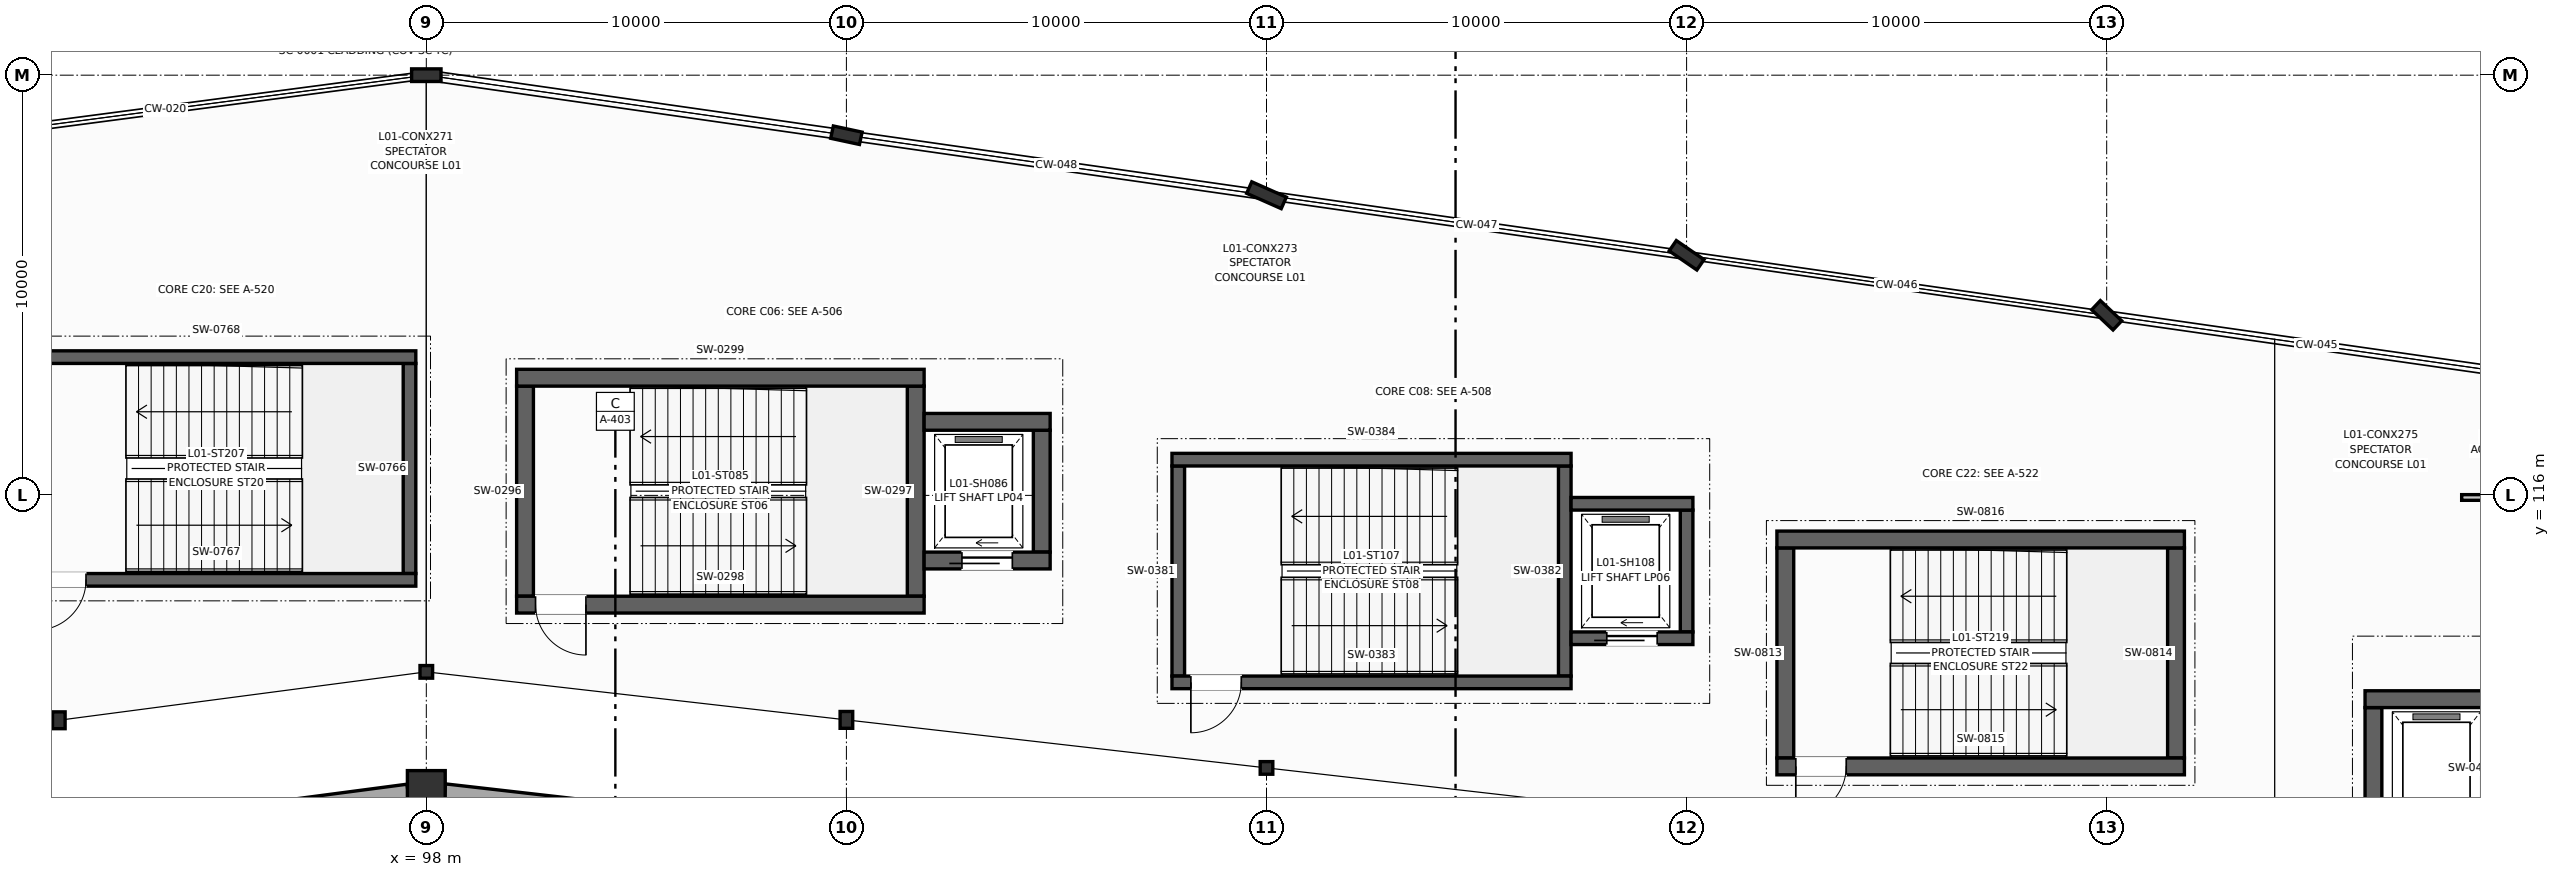
"""IFC4 building model, lengths in metres.
Left out: names, types, materials, properties, quantities, classifications, styles, units other than length and angle.
Written with IfcOpenShell. Run it as: python <this file> out.ifc"""

import sys

from ifc_helpers import new_model, si_unit, direction, frame, frame_2d, origin, origin_2d, place, context, subcontext, project, spatial, rectangle, i_section, extrude, element, fill, save


model = new_model("IFC4")
c1 = context("Model", 3, precision=1e-05, world=origin(), true_north=direction((0.0, 1.0)))
c2 = subcontext(c1, "Body", "Model", "MODEL_VIEW")
j1 = project(units=[si_unit("LENGTHUNIT", "METRE"), si_unit("PLANEANGLEUNIT", "RADIAN")], contexts=[c1])
p1 = place(None, origin())
s1 = spatial("IfcSite", under=j1, at=p1, CompositionType="ELEMENT")
p2 = place(p1, origin())
s2 = spatial("IfcBuilding", under=s1, at=p2, CompositionType="ELEMENT")
p3 = place(p2, frame((0.0, 0.0, 4.5)))
s3 = spatial("IfcBuildingStorey", under=s2, at=p3, CompositionType="ELEMENT", Elevation=4.5)
p4 = place(p3, frame((98.0, 109.0, 0.0), z_axis=(0.0, 0.0, 1.0), x_axis=(0.0, 1.0, 0.0)))
e1 = element("IfcColumn", 1, at=p4, inside=s3, PredefinedType="COLUMN", context=c2, shape_type="SweptSolid", body=[
    extrude(rectangle(XDim=0.9, YDim=0.9, at=origin_2d()), origin(), (0.0, 0.0, 1.0), 4.5),
])
p5 = place(p3, frame((98.0, 111.8, 0.0), z_axis=(0.0, 0.0, 1.0), x_axis=(1.0, 0.0, 0.0)))
e2 = element("IfcColumn", 2, at=p5, inside=s3, PredefinedType="COLUMN", context=c2, shape_type="SweptSolid", body=[
    extrude(i_section(OverallWidth=0.3, OverallDepth=0.3, WebThickness=0.011, FlangeThickness=0.019, at=origin_2d()), origin(), (0.0, 0.0, 1.0), 4.5),
])
p6 = place(p3, frame((89.252, 110.648, 0.0), z_axis=(0.0, 0.0, 1.0), x_axis=(1.0, 0.0, 0.0)))
e3 = element("IfcColumn", 3, at=p6, inside=s3, PredefinedType="COLUMN", context=c2, shape_type="SweptSolid", body=[
    extrude(i_section(OverallWidth=0.3, OverallDepth=0.4, WebThickness=0.013, FlangeThickness=0.024, at=origin_2d()), origin(), (0.0, 0.0, 1.0), 4.5),
])
p7 = place(p3, frame((118.0, 109.514, 0.0), z_axis=(0.0, 0.0, 1.0), x_axis=(1.0, 0.0, 0.0)))
e4 = element("IfcColumn", 4, at=p7, inside=s3, PredefinedType="COLUMN", context=c2, shape_type="SweptSolid", body=[
    extrude(i_section(OverallWidth=0.3, OverallDepth=0.3, WebThickness=0.011, FlangeThickness=0.019, at=origin_2d()), origin(), (0.0, 0.0, 1.0), 4.5),
])
p8 = place(p3, frame((108.0, 110.657, 0.0), z_axis=(0.0, 0.0, 1.0), x_axis=(1.0, 0.0, 0.0)))
e5 = element("IfcColumn", 5, at=p8, inside=s3, PredefinedType="COLUMN", context=c2, shape_type="SweptSolid", body=[
    extrude(i_section(OverallWidth=0.3, OverallDepth=0.4, WebThickness=0.013, FlangeThickness=0.024, at=origin_2d()), origin(), (0.0, 0.0, 1.0), 4.5),
])
for number, where, z_axis, x_axis in (
    (6, (98.0, 126.0, 0.0), (0.0, 0.0, 1.0), (0.0, 1.0, 0.0)),
    (7, (138.0, 120.286, 0.0), (0.0, 0.0, 1.0), (0.687, 0.727, 0.0)),
):
    element("IfcColumn", number, at=place(p3, frame(where, z_axis=z_axis, x_axis=x_axis)), inside=s3, PredefinedType="COLUMN", context=c2, shape_type="SweptSolid", body=[
        extrude(i_section(OverallWidth=0.3, OverallDepth=0.7, WebThickness=0.017, FlangeThickness=0.032, at=origin_2d()), origin(), (0.0, 0.0, 1.0), 4.5),
    ])
p9 = place(p3, frame((128.0, 121.714, 0.0), z_axis=(0.0, 0.0, 1.0), x_axis=(0.566406236925, 0.824126188622, 0.0)))
e8 = element("IfcColumn", 8, at=p9, inside=s3, PredefinedType="COLUMN", context=c2, shape_type="SweptSolid", body=[
    extrude(i_section(OverallWidth=0.3, OverallDepth=0.8, WebThickness=0.018, FlangeThickness=0.033, at=origin_2d()), origin(), (0.0, 0.0, 1.0), 4.5),
])
p10 = place(p3, frame((118.0, 123.143, 0.0), z_axis=(0.0, 0.0, 1.0), x_axis=(0.40514158678, 0.914253955234, 0.0)))
e9 = element("IfcColumn", 9, at=p10, inside=s3, PredefinedType="COLUMN", context=c2, shape_type="SweptSolid", body=[
    extrude(i_section(OverallWidth=0.3, OverallDepth=0.9, WebThickness=0.019, FlangeThickness=0.035, at=origin_2d()), origin(), (0.0, 0.0, 1.0), 4.5),
])
p11 = place(p3, frame((108.0, 124.571, 0.0), z_axis=(0.0, 0.0, 1.0), x_axis=(0.209618562904, 0.977783236759, 0.0)))
e10 = element("IfcColumn", 10, at=p11, inside=s3, PredefinedType="COLUMN", context=c2, shape_type="SweptSolid", body=[
    extrude(i_section(OverallWidth=0.3, OverallDepth=0.7, WebThickness=0.017, FlangeThickness=0.032, at=origin_2d()), origin(), (0.0, 0.0, 1.0), 4.5),
])
p12 = place(p3, frame((97.564, 108.943, 0.0), z_axis=(0.0, 0.0, 1.0), x_axis=(-0.991432160885, -0.130622625772, 0.0)))
e11 = element("IfcWall", 11, at=p12, inside=s3, PredefinedType="SOLIDWALL", context=c2, shape_type="SweptSolid", body=[
    extrude(rectangle(XDim=7.213, YDim=0.37, at=frame_2d((3.606, 0.0))), origin(), (0.0, 0.0, 1.0), 3.3),
])
p13 = place(p3, frame((107.563, 107.907, 0.0), z_axis=(0.0, 0.0, 1.0), x_axis=(-0.993532672656, 0.113546591161, 0.0)))
e12 = element("IfcWall", 12, at=p13, inside=s3, PredefinedType="SOLIDWALL", context=c2, shape_type="SweptSolid", body=[
    extrude(rectangle(XDim=9.185, YDim=0.37, at=frame_2d((4.593, 0.0))), origin(), (0.0, 0.0, 1.0), 3.3),
])
for number, where, z_axis, x_axis in (
    (13, (100.35, 113.6, 0.0), (0.0, 0.0, 1.0), (0.0, 1.0, 0.0)),
    (14, (109.65, 113.6, 0.0), (0.0, 0.0, 1.0), (0.0, 1.0, 0.0)),
):
    element("IfcWall", number, at=place(p3, frame(where, z_axis=z_axis, x_axis=x_axis)), inside=s3, PredefinedType="SHEAR", context=c2, shape_type="SweptSolid", body=[
        extrude(rectangle(XDim=5.0, YDim=0.4, at=frame_2d((2.5, 0.0))), origin(), (0.0, 0.0, 1.0), 4.25),
    ])
p14 = place(p3, frame((100.15, 113.4, 0.0), z_axis=(0.0, 0.0, 1.0), x_axis=(1.0, 0.0, 0.0)))
e15 = element("IfcWall", 15, at=p14, inside=s3, PredefinedType="SHEAR", context=c2, shape_type="SweptSolid", body=[
    extrude(rectangle(XDim=9.7, YDim=0.4, at=frame_2d((4.85, 0.0))), origin(), (0.0, 0.0, 1.0), 4.25),
])
p15 = place(p14, frame((0.45, 0.0, 0.0)))
e16 = element("IfcOpeningElement", 16, at=p15, cuts=e15, PredefinedType="OPENING", context=c2, shape_type="SweptSolid", body=[
    extrude(rectangle(XDim=1.2, YDim=2.2, at=frame_2d((0.6, 1.1))), frame((0.0, 0.21, 0.0), z_axis=(0.0, -1.0, 0.0), x_axis=(1.0, 0.0, 0.0)), (0.0, 0.0, 1.0), 0.42),
])
p16 = place(p3, frame((100.15, 118.8, 0.0), z_axis=(0.0, 0.0, 1.0), x_axis=(1.0, 0.0, 0.0)))
e17 = element("IfcWall", 17, at=p16, inside=s3, PredefinedType="SHEAR", context=c2, shape_type="SweptSolid", body=[
    extrude(rectangle(XDim=9.7, YDim=0.4, at=frame_2d((4.85, 0.0))), origin(), (0.0, 0.0, 1.0), 4.25),
])
p17 = place(p3, frame((112.65, 114.65, 0.0), z_axis=(0.0, 0.0, 1.0), x_axis=(0.0, 1.0, 0.0)))
e18 = element("IfcWall", 18, at=p17, inside=s3, PredefinedType="SHEAR", context=c2, shape_type="SweptSolid", body=[
    extrude(rectangle(XDim=2.9, YDim=0.4, at=frame_2d((1.45, 0.0))), origin(), (0.0, 0.0, 1.0), 4.25),
])
p18 = place(p3, frame((109.85, 114.45, 0.0), z_axis=(0.0, 0.0, 1.0), x_axis=(1.0, 0.0, 0.0)))
e19 = element("IfcWall", 19, at=p18, inside=s3, PredefinedType="SHEAR", context=c2, shape_type="SweptSolid", body=[
    extrude(rectangle(XDim=3.0, YDim=0.4, at=frame_2d((1.5, 0.0))), origin(), (0.0, 0.0, 1.0), 4.25),
])
p19 = place(p18, frame((0.9, 0.0, 0.0)))
e20 = element("IfcOpeningElement", 20, at=p19, cuts=e19, PredefinedType="OPENING", context=c2, shape_type="SweptSolid", body=[
    extrude(rectangle(XDim=1.2, YDim=2.2, at=frame_2d((0.6, 1.1))), frame((0.0, 0.21, 0.0), z_axis=(0.0, -1.0, 0.0), x_axis=(1.0, 0.0, 0.0)), (0.0, 0.0, 1.0), 0.42),
])
p20 = place(p3, frame((109.85, 117.75, 0.0), z_axis=(0.0, 0.0, 1.0), x_axis=(1.0, 0.0, 0.0)))
e21 = element("IfcWall", 21, at=p20, inside=s3, PredefinedType="SHEAR", context=c2, shape_type="SweptSolid", body=[
    extrude(rectangle(XDim=3.0, YDim=0.4, at=frame_2d((1.5, 0.0))), origin(), (0.0, 0.0, 1.0), 4.25),
])
for number, where, z_axis, x_axis in (
    (22, (115.9, 111.7, 0.0), (0.0, 0.0, 1.0), (0.0, 1.0, 0.0)),
    (23, (125.1, 111.7, 0.0), (0.0, 0.0, 1.0), (0.0, 1.0, 0.0)),
):
    element("IfcWall", number, at=place(p3, frame(where, z_axis=z_axis, x_axis=x_axis)), inside=s3, PredefinedType="SHEAR", context=c2, shape_type="SweptSolid", body=[
        extrude(rectangle(XDim=5.0, YDim=0.3, at=frame_2d((2.5, 0.0))), origin(), (0.0, 0.0, 1.0), 4.25),
    ])
p21 = place(p3, frame((115.75, 111.55, 0.0), z_axis=(0.0, 0.0, 1.0), x_axis=(1.0, 0.0, 0.0)))
e24 = element("IfcWall", 24, at=p21, inside=s3, PredefinedType="SHEAR", context=c2, shape_type="SweptSolid", body=[
    extrude(rectangle(XDim=9.5, YDim=0.3, at=frame_2d((4.75, 0.0))), origin(), (0.0, 0.0, 1.0), 4.25),
])
p22 = place(p21, frame((0.45, 0.0, 0.0)))
e25 = element("IfcOpeningElement", 25, at=p22, cuts=e24, PredefinedType="OPENING", context=c2, shape_type="SweptSolid", body=[
    extrude(rectangle(XDim=1.2, YDim=2.2, at=frame_2d((0.6, 1.1))), frame((0.0, 0.16, 0.0), z_axis=(0.0, -1.0, 0.0), x_axis=(1.0, 0.0, 0.0)), (0.0, 0.0, 1.0), 0.32),
])
p23 = place(p3, frame((115.75, 116.85, 0.0), z_axis=(0.0, 0.0, 1.0), x_axis=(1.0, 0.0, 0.0)))
e26 = element("IfcWall", 26, at=p23, inside=s3, PredefinedType="SHEAR", context=c2, shape_type="SweptSolid", body=[
    extrude(rectangle(XDim=9.5, YDim=0.3, at=frame_2d((4.75, 0.0))), origin(), (0.0, 0.0, 1.0), 4.25),
])
p24 = place(p3, frame((128.0, 112.75, 0.0), z_axis=(0.0, 0.0, 1.0), x_axis=(0.0, 1.0, 0.0)))
e27 = element("IfcWall", 27, at=p24, inside=s3, PredefinedType="SHEAR", context=c2, shape_type="SweptSolid", body=[
    extrude(rectangle(XDim=2.9, YDim=0.3, at=frame_2d((1.45, 0.0))), origin(), (0.0, 0.0, 1.0), 4.25),
])
p25 = place(p3, frame((125.25, 112.6, 0.0), z_axis=(0.0, 0.0, 1.0), x_axis=(1.0, 0.0, 0.0)))
e28 = element("IfcWall", 28, at=p25, inside=s3, PredefinedType="SHEAR", context=c2, shape_type="SweptSolid", body=[
    extrude(rectangle(XDim=2.9, YDim=0.3, at=frame_2d((1.45, 0.0))), origin(), (0.0, 0.0, 1.0), 4.25),
])
p26 = place(p25, frame((0.85, 0.0, 0.0)))
e29 = element("IfcOpeningElement", 29, at=p26, cuts=e28, PredefinedType="OPENING", context=c2, shape_type="SweptSolid", body=[
    extrude(rectangle(XDim=1.2, YDim=2.2, at=frame_2d((0.6, 1.1))), frame((0.0, 0.16, 0.0), z_axis=(0.0, -1.0, 0.0), x_axis=(1.0, 0.0, 0.0)), (0.0, 0.0, 1.0), 0.32),
])
p27 = place(p3, frame((125.25, 115.8, 0.0), z_axis=(0.0, 0.0, 1.0), x_axis=(1.0, 0.0, 0.0)))
e30 = element("IfcWall", 30, at=p27, inside=s3, PredefinedType="SHEAR", context=c2, shape_type="SweptSolid", body=[
    extrude(rectangle(XDim=2.9, YDim=0.3, at=frame_2d((1.45, 0.0))), origin(), (0.0, 0.0, 1.0), 4.25),
])
p28 = place(p3, frame((144.35, 108.05, 0.0), z_axis=(0.0, 0.0, 1.0), x_axis=(0.0, 1.0, 0.0)))
e31 = element("IfcWall", 31, at=p28, inside=s3, PredefinedType="SHEAR", context=c2, shape_type="SweptSolid", body=[
    extrude(rectangle(XDim=2.9, YDim=0.4, at=frame_2d((1.45, 0.0))), origin(), (0.0, 0.0, 1.0), 4.25),
])
p29 = place(p3, frame((144.15, 111.15, 0.0), z_axis=(0.0, 0.0, 1.0), x_axis=(1.0, 0.0, 0.0)))
e32 = element("IfcWall", 32, at=p29, inside=s3, PredefinedType="SHEAR", context=c2, shape_type="SweptSolid", body=[
    extrude(rectangle(XDim=3.0, YDim=0.4, at=frame_2d((1.5, 0.0))), origin(), (0.0, 0.0, 1.0), 4.25),
])
p30 = place(p3, frame((97.6, 114.14, 0.0), z_axis=(0.0, 0.0, 1.0), x_axis=(0.0, 1.0, 0.0)))
e33 = element("IfcWall", 33, at=p30, inside=s3, PredefinedType="SHEAR", context=c2, shape_type="SweptSolid", body=[
    extrude(rectangle(XDim=5.0, YDim=0.3, at=frame_2d((2.5, 0.0))), origin(), (0.0, 0.0, 1.0), 4.25),
])
p31 = place(p3, frame((88.25, 113.99, 0.0), z_axis=(0.0, 0.0, 1.0), x_axis=(1.0, 0.0, 0.0)))
e34 = element("IfcWall", 34, at=p31, inside=s3, PredefinedType="SHEAR", context=c2, shape_type="SweptSolid", body=[
    extrude(rectangle(XDim=9.5, YDim=0.3, at=frame_2d((4.75, 0.0))), origin(), (0.0, 0.0, 1.0), 4.25),
])
p32 = place(p31, frame((0.45, 0.0, 0.0)))
e35 = element("IfcOpeningElement", 35, at=p32, cuts=e34, PredefinedType="OPENING", context=c2, shape_type="SweptSolid", body=[
    extrude(rectangle(XDim=1.2, YDim=2.2, at=frame_2d((0.6, 1.1))), frame((0.0, 0.16, 0.0), z_axis=(0.0, -1.0, 0.0), x_axis=(1.0, 0.0, 0.0)), (0.0, 0.0, 1.0), 0.32),
])
p33 = place(p3, frame((88.25, 119.29, 0.0), z_axis=(0.0, 0.0, 1.0), x_axis=(1.0, 0.0, 0.0)))
e36 = element("IfcWall", 36, at=p33, inside=s3, PredefinedType="SHEAR", context=c2, shape_type="SweptSolid", body=[
    extrude(rectangle(XDim=9.5, YDim=0.3, at=frame_2d((4.75, 0.0))), origin(), (0.0, 0.0, 1.0), 4.25),
])
for number, where, z_axis, x_axis in (
    (37, (130.35, 109.75, 0.0), (0.0, 0.0, 1.0), (0.0, 1.0, 0.0)),
    (38, (139.65, 109.75, 0.0), (0.0, 0.0, 1.0), (0.0, 1.0, 0.0)),
):
    element("IfcWall", number, at=place(p3, frame(where, z_axis=z_axis, x_axis=x_axis)), inside=s3, PredefinedType="SHEAR", context=c2, shape_type="SweptSolid", body=[
        extrude(rectangle(XDim=5.0, YDim=0.4, at=frame_2d((2.5, 0.0))), origin(), (0.0, 0.0, 1.0), 4.25),
    ])
p34 = place(p3, frame((130.15, 109.55, 0.0), z_axis=(0.0, 0.0, 1.0), x_axis=(1.0, 0.0, 0.0)))
e39 = element("IfcWall", 39, at=p34, inside=s3, PredefinedType="SHEAR", context=c2, shape_type="SweptSolid", body=[
    extrude(rectangle(XDim=9.7, YDim=0.4, at=frame_2d((4.85, 0.0))), origin(), (0.0, 0.0, 1.0), 4.25),
])
p35 = place(p34, frame((0.45, 0.0, 0.0)))
e40 = element("IfcOpeningElement", 40, at=p35, cuts=e39, PredefinedType="OPENING", context=c2, shape_type="SweptSolid", body=[
    extrude(rectangle(XDim=1.2, YDim=2.2, at=frame_2d((0.6, 1.1))), frame((0.0, 0.21, 0.0), z_axis=(0.0, -1.0, 0.0), x_axis=(1.0, 0.0, 0.0)), (0.0, 0.0, 1.0), 0.42),
])
p36 = place(p3, frame((130.15, 114.95, 0.0), z_axis=(0.0, 0.0, 1.0), x_axis=(1.0, 0.0, 0.0)))
e41 = element("IfcWall", 41, at=p36, inside=s3, PredefinedType="SHEAR", context=c2, shape_type="SweptSolid", body=[
    extrude(rectangle(XDim=9.7, YDim=0.4, at=frame_2d((4.85, 0.0))), origin(), (0.0, 0.0, 1.0), 4.25),
])
p37 = place(p3, frame((146.45, 115.95, 0.0), z_axis=(0.0, 0.0, 1.0), x_axis=(1.0, 0.0, 0.0)))
e42 = element("IfcWall", 42, at=p37, inside=s3, PredefinedType="PARTITIONING", context=c2, shape_type="SweptSolid", body=[
    extrude(rectangle(XDim=13.1, YDim=0.135, at=frame_2d((6.55, 0.0))), origin(), (0.0, 0.0, 1.0), 3.22),
])
p38 = place(p37, frame((5.98, 0.0, 0.0)))
e43 = element("IfcOpeningElement", 43, at=p38, cuts=e42, PredefinedType="OPENING", context=c2, shape_type="SweptSolid", body=[
    extrude(rectangle(XDim=1.14, YDim=2.18, at=frame_2d((0.57, 1.09))), frame((0.0, 0.077, 0.0), z_axis=(0.0, -1.0, 0.0), x_axis=(1.0, 0.0, 0.0)), (0.0, 0.0, 1.0), 0.155),
])
p39 = place(p15, frame((1.2, 0.0, 0.0), z_axis=(0.0, 0.0, 1.0), x_axis=(-1.0, 0.0, 0.0)))
e44 = element("IfcDoor", 44, at=p39, inside=s3, OperationType="SINGLE_SWING_RIGHT", PredefinedType="DOOR", context=c2, shape_type="SweptSolid", body=[
    extrude(rectangle(XDim=1.2, YDim=2.2, at=frame_2d((0.6, 1.1))), frame((0.0, 0.025, 0.0), z_axis=(0.0, -1.0, 0.0), x_axis=(1.0, 0.0, 0.0)), (0.0, 0.0, 1.0), 0.05),
])
fill(e16, e44)
p40 = place(p19, origin())
e45 = element("IfcDoor", 45, at=p40, inside=s3, OperationType="SLIDING_TO_LEFT", PredefinedType="DOOR", context=c2, shape_type="SweptSolid", body=[
    extrude(rectangle(XDim=1.2, YDim=2.2, at=frame_2d((0.6, 1.1))), frame((0.0, 0.025, 0.0), z_axis=(0.0, -1.0, 0.0), x_axis=(1.0, 0.0, 0.0)), (0.0, 0.0, 1.0), 0.05),
])
fill(e20, e45)
p41 = place(p22, frame((1.2, 0.0, 0.0), z_axis=(0.0, 0.0, 1.0), x_axis=(-1.0, 0.0, 0.0)))
e46 = element("IfcDoor", 46, at=p41, inside=s3, OperationType="SINGLE_SWING_LEFT", PredefinedType="DOOR", context=c2, shape_type="SweptSolid", body=[
    extrude(rectangle(XDim=1.2, YDim=2.2, at=frame_2d((0.6, 1.1))), frame((0.0, 0.025, 0.0), z_axis=(0.0, -1.0, 0.0), x_axis=(1.0, 0.0, 0.0)), (0.0, 0.0, 1.0), 0.05),
])
fill(e25, e46)
p42 = place(p26, origin())
e47 = element("IfcDoor", 47, at=p42, inside=s3, OperationType="SLIDING_TO_LEFT", PredefinedType="DOOR", context=c2, shape_type="SweptSolid", body=[
    extrude(rectangle(XDim=1.2, YDim=2.2, at=frame_2d((0.6, 1.1))), frame((0.0, 0.025, 0.0), z_axis=(0.0, -1.0, 0.0), x_axis=(1.0, 0.0, 0.0)), (0.0, 0.0, 1.0), 0.05),
])
fill(e29, e47)
p43 = place(p32, frame((1.2, 0.0, 0.0), z_axis=(0.0, 0.0, 1.0), x_axis=(-1.0, 0.0, 0.0)))
e48 = element("IfcDoor", 48, at=p43, inside=s3, OperationType="SINGLE_SWING_LEFT", PredefinedType="DOOR", context=c2, shape_type="SweptSolid", body=[
    extrude(rectangle(XDim=1.2, YDim=2.2, at=frame_2d((0.6, 1.1))), frame((0.0, 0.025, 0.0), z_axis=(0.0, -1.0, 0.0), x_axis=(1.0, 0.0, 0.0)), (0.0, 0.0, 1.0), 0.05),
])
fill(e35, e48)
p44 = place(p35, frame((1.2, 0.0, 0.0), z_axis=(0.0, 0.0, 1.0), x_axis=(-1.0, 0.0, 0.0)))
e49 = element("IfcDoor", 49, at=p44, inside=s3, OperationType="SINGLE_SWING_LEFT", PredefinedType="DOOR", context=c2, shape_type="SweptSolid", body=[
    extrude(rectangle(XDim=1.2, YDim=2.2, at=frame_2d((0.6, 1.1))), frame((0.0, 0.025, 0.0), z_axis=(0.0, -1.0, 0.0), x_axis=(1.0, 0.0, 0.0)), (0.0, 0.0, 1.0), 0.05),
])
fill(e40, e49)
save(model, sys.argv[1])
